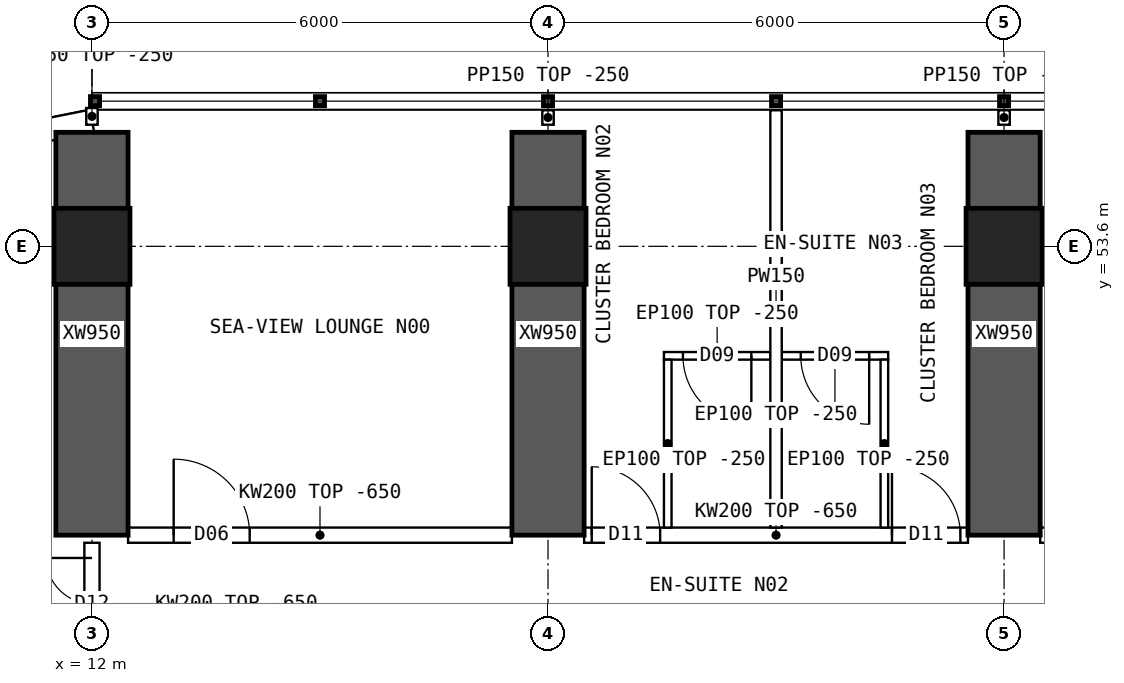
"""IFC4 building model, lengths in metres.
Left out: names, types, materials, properties, quantities, classifications, styles, units other than length and angle.
Written with IfcOpenShell. Run it as: python <this file> out.ifc"""

import sys

from ifc_helpers import new_model, si_unit, direction, frame, frame_2d, origin, origin_2d, place, context, subcontext, project, spatial, polyline, rectangle, hollow_rectangle, outline, extrude, element, fill, save


model = new_model("IFC4")
c1 = context("Model", 3, precision=1e-05, world=origin(), true_north=direction((0.0, 1.0)))
c2 = subcontext(c1, "Body", "Model", "MODEL_VIEW")
j1 = project(units=[si_unit("LENGTHUNIT", "METRE"), si_unit("PLANEANGLEUNIT", "RADIAN")], contexts=[c1])
p1 = place(None, origin())
s1 = spatial("IfcSite", under=j1, at=p1, CompositionType="ELEMENT")
p2 = place(p1, origin())
s2 = spatial("IfcBuilding", under=s1, at=p2, CompositionType="ELEMENT")
p3 = place(p2, frame((0.0, 0.0, 91.9)))
s3 = spatial("IfcBuildingStorey", under=s2, at=p3, CompositionType="ELEMENT", Elevation=91.9)
for number, where, z_axis, x_axis in (
    (1, (12.0, 53.6, 0.0), (0.0, 0.0, 1.0), (1.0, 0.0, 0.0)),
    (2, (18.0, 53.6, 0.0), (0.0, 0.0, 1.0), (1.0, 0.0, 0.0)),
    (3, (24.0, 53.6, 0.0), (0.0, 0.0, 1.0), (1.0, 0.0, 0.0)),
):
    element("IfcColumn", number, at=place(p3, frame(where, z_axis=z_axis, x_axis=x_axis)), inside=s3, PredefinedType="COLUMN", context=c2, shape_type="SweptSolid", body=[
        extrude(hollow_rectangle(XDim=1.0, YDim=1.0, WallThickness=0.1, at=origin_2d()), origin(), (0.0, 0.0, 1.0), 3.75),
    ])
for number, where, z_axis, x_axis in (
    (4, (12.0, 49.8, 0.0), (0.0, 0.0, 1.0), (0.0, 1.0, 0.0)),
    (5, (18.0, 49.8, 0.0), (0.0, 0.0, 1.0), (0.0, 1.0, 0.0)),
    (6, (24.0, 49.8, 0.0), (0.0, 0.0, 1.0), (0.0, 1.0, 0.0)),
):
    element("IfcWall", number, at=place(p3, frame(where, z_axis=z_axis, x_axis=x_axis)), inside=s3, PredefinedType="SHEAR", context=c2, shape_type="SweptSolid", body=[
        extrude(rectangle(XDim=5.3, YDim=0.95, at=frame_2d((2.65, 0.0))), origin(), (0.0, 0.0, 1.0), 3.75),
    ])
p4 = place(p3, frame((12.0, 55.25, 0.0), z_axis=(0.0, 0.0, 1.0), x_axis=(-0.980787251524, -0.195080412259, 0.0)))
e7 = element("IfcWall", 7, at=p4, inside=s3, PredefinedType="SOLIDWALL", context=c2, shape_type="SweptSolid", body=[
    extrude(outline(polyline([(-0.03, -0.15), (3.249, -0.15), (3.189, 0.15), (0.03, 0.15), (-0.03, -0.15)])), origin(), (0.0, 0.0, 1.0), 3.5),
])
p5 = place(p4, frame((0.909, 0.0, 0.9)))
e8 = element("IfcOpeningElement", 8, at=p5, cuts=e7, PredefinedType="OPENING", context=c2, shape_type="SweptSolid", body=[
    extrude(rectangle(XDim=1.4, YDim=1.8, at=frame_2d((0.7, 0.9))), frame((0.0, 0.16, 0.0), z_axis=(0.0, -1.0, 0.0), x_axis=(1.0, 0.0, 0.0)), (0.0, 0.0, 1.0), 0.32),
])
p6 = place(p3, frame((12.475, 49.8, 0.0), z_axis=(0.0, 0.0, 1.0), x_axis=(1.0, 0.0, 0.0)))
e9 = element("IfcWall", 9, at=p6, inside=s3, PredefinedType="SOLIDWALL", context=c2, shape_type="SweptSolid", body=[
    extrude(outline(polyline([(0.0, 0.0), (5.05, 0.0), (5.05, 3.1), (0.0, 3.1), (0.0, 0.0)])), frame((0.0, 0.1, 0.0), z_axis=(0.0, -1.0, 0.0), x_axis=(1.0, 0.0, 0.0)), (0.0, 0.0, 1.0), 0.2),
])
p7 = place(p6, frame((0.6, 0.0, 0.0)))
e10 = element("IfcOpeningElement", 10, at=p7, cuts=e9, PredefinedType="OPENING", context=c2, shape_type="SweptSolid", body=[
    extrude(rectangle(XDim=1.0, YDim=2.1, at=frame_2d((0.5, 1.05))), frame((0.0, 0.11, 0.0), z_axis=(0.0, -1.0, 0.0), x_axis=(1.0, 0.0, 0.0)), (0.0, 0.0, 1.0), 0.22),
])
p8 = place(p3, frame((18.475, 49.8, 0.0), z_axis=(0.0, 0.0, 1.0), x_axis=(1.0, 0.0, 0.0)))
e11 = element("IfcWall", 11, at=p8, inside=s3, PredefinedType="SOLIDWALL", context=c2, shape_type="SweptSolid", body=[
    extrude(outline(polyline([(0.0, 0.0), (5.05, 0.0), (5.05, 3.1), (0.0, 3.1), (0.0, 0.0)])), frame((0.0, 0.1, 0.0), z_axis=(0.0, -1.0, 0.0), x_axis=(1.0, 0.0, 0.0)), (0.0, 0.0, 1.0), 0.2),
])
p9 = place(p8, frame((0.1, 0.0, 0.0)))
e12 = element("IfcOpeningElement", 12, at=p9, cuts=e11, PredefinedType="OPENING", context=c2, shape_type="SweptSolid", body=[
    extrude(rectangle(XDim=0.9, YDim=2.1, at=frame_2d((0.45, 1.05))), frame((0.0, 0.11, 0.0), z_axis=(0.0, -1.0, 0.0), x_axis=(1.0, 0.0, 0.0)), (0.0, 0.0, 1.0), 0.22),
])
p10 = place(p8, frame((4.05, 0.0, 0.0)))
e13 = element("IfcOpeningElement", 13, at=p10, cuts=e11, PredefinedType="OPENING", context=c2, shape_type="SweptSolid", body=[
    extrude(rectangle(XDim=0.9, YDim=2.1, at=frame_2d((0.45, 1.05))), frame((0.0, 0.11, 0.0), z_axis=(0.0, -1.0, 0.0), x_axis=(1.0, 0.0, 0.0)), (0.0, 0.0, 1.0), 0.22),
])
p11 = place(p3, frame((24.475, 49.8, 0.0), z_axis=(0.0, 0.0, 1.0), x_axis=(1.0, 0.0, 0.0)))
e14 = element("IfcWall", 14, at=p11, inside=s3, PredefinedType="SOLIDWALL", context=c2, shape_type="SweptSolid", body=[
    extrude(outline(polyline([(0.0, 0.0), (5.05, 0.0), (5.05, 3.1), (0.0, 3.1), (0.0, 0.0)])), frame((0.0, 0.1, 0.0), z_axis=(0.0, -1.0, 0.0), x_axis=(1.0, 0.0, 0.0)), (0.0, 0.0, 1.0), 0.2),
])
p12 = place(p11, frame((0.6, 0.0, 0.0)))
e15 = element("IfcOpeningElement", 15, at=p12, cuts=e14, PredefinedType="OPENING", context=c2, shape_type="SweptSolid", body=[
    extrude(rectangle(XDim=1.0, YDim=2.1, at=frame_2d((0.5, 1.05))), frame((0.0, 0.11, 0.0), z_axis=(0.0, -1.0, 0.0), x_axis=(1.0, 0.0, 0.0)), (0.0, 0.0, 1.0), 0.22),
])
p13 = place(p3, frame((21.0, 55.39, 0.0), z_axis=(0.0, 0.0, 1.0), x_axis=(0.0, -1.0, 0.0)))
e16 = element("IfcWall", 16, at=p13, inside=s3, PredefinedType="PARTITIONING", context=c2, shape_type="SweptSolid", body=[
    extrude(outline(polyline([(0.0, 0.0), (5.49, 0.0), (5.49, 3.1), (5.442, 3.1), (5.44, 3.5), (1.992, 3.5), (1.99, 3.1), (1.592, 3.1), (1.59, 3.5), (0.0, 3.5), (0.0, 0.0)])), frame((0.0, 0.075, 0.0), z_axis=(0.0, -1.0, 0.0), x_axis=(1.0, 0.0, 0.0)), (0.0, 0.0, 1.0), 0.15),
])
p14 = place(p3, frame((19.525, 52.159, 0.0), z_axis=(0.0, 0.0, 1.0), x_axis=(1.0, 0.0, 0.0)))
e17 = element("IfcWall", 17, at=p14, inside=s3, PredefinedType="PARTITIONING", context=c2, shape_type="SweptSolid", body=[
    extrude(rectangle(XDim=1.4, YDim=0.1, at=frame_2d((0.7, 0.0))), origin(), (0.0, 0.0, 1.0), 3.5),
])
p15 = place(p14, frame((0.25, 0.0, 0.0)))
e18 = element("IfcOpeningElement", 18, at=p15, cuts=e17, PredefinedType="OPENING", context=c2, shape_type="SweptSolid", body=[
    extrude(rectangle(XDim=0.9, YDim=2.1, at=frame_2d((0.45, 1.05))), frame((0.0, 0.06, 0.0), z_axis=(0.0, -1.0, 0.0), x_axis=(1.0, 0.0, 0.0)), (0.0, 0.0, 1.0), 0.12),
])
p16 = place(p3, frame((19.575, 52.109, 0.0), z_axis=(0.0, 0.0, 1.0), x_axis=(0.0, -1.0, 0.0)))
e19 = element("IfcWall", 19, at=p16, inside=s3, PredefinedType="PARTITIONING", context=c2, shape_type="SweptSolid", body=[
    extrude(outline(polyline([(0.0, 0.0), (2.209, 0.0), (2.209, 3.1), (2.161, 3.1), (2.159, 3.5), (0.0, 3.5), (0.0, 0.0)])), frame((0.0, 0.05, 0.0), z_axis=(0.0, -1.0, 0.0), x_axis=(1.0, 0.0, 0.0)), (0.0, 0.0, 1.0), 0.1),
])
p17 = place(p3, frame((21.075, 52.159, 0.0), z_axis=(0.0, 0.0, 1.0), x_axis=(1.0, 0.0, 0.0)))
e20 = element("IfcWall", 20, at=p17, inside=s3, PredefinedType="PARTITIONING", context=c2, shape_type="SweptSolid", body=[
    extrude(rectangle(XDim=1.4, YDim=0.1, at=frame_2d((0.7, 0.0))), origin(), (0.0, 0.0, 1.0), 3.5),
])
p18 = place(p17, frame((0.25, 0.0, 0.0)))
e21 = element("IfcOpeningElement", 21, at=p18, cuts=e20, PredefinedType="OPENING", context=c2, shape_type="SweptSolid", body=[
    extrude(rectangle(XDim=0.9, YDim=2.1, at=frame_2d((0.45, 1.05))), frame((0.0, 0.06, 0.0), z_axis=(0.0, -1.0, 0.0), x_axis=(1.0, 0.0, 0.0)), (0.0, 0.0, 1.0), 0.12),
])
p19 = place(p3, frame((22.425, 52.109, 0.0), z_axis=(0.0, 0.0, 1.0), x_axis=(0.0, -1.0, 0.0)))
e22 = element("IfcWall", 22, at=p19, inside=s3, PredefinedType="PARTITIONING", context=c2, shape_type="SweptSolid", body=[
    extrude(outline(polyline([(0.0, 0.0), (2.209, 0.0), (2.209, 3.1), (2.161, 3.1), (2.159, 3.5), (0.0, 3.5), (0.0, 0.0)])), frame((0.0, 0.05, 0.0), z_axis=(0.0, -1.0, 0.0), x_axis=(1.0, 0.0, 0.0)), (0.0, 0.0, 1.0), 0.1),
])
p20 = place(p3, frame((12.0, 48.1, 0.0), z_axis=(0.0, 0.0, 1.0), x_axis=(0.0, 1.0, 0.0)))
e23 = element("IfcWall", 23, at=p20, inside=s3, PredefinedType="SOLIDWALL", context=c2, shape_type="SweptSolid", body=[
    extrude(outline(polyline([(0.0, 0.0), (1.6, 0.0), (1.6, 3.1), (0.0, 3.1), (0.0, 0.0)])), frame((0.0, 0.1, 0.0), z_axis=(0.0, -1.0, 0.0), x_axis=(1.0, 0.0, 0.0)), (0.0, 0.0, 1.0), 0.2),
])
p21 = place(p20, frame((0.2, 0.0, 0.0)))
e24 = element("IfcOpeningElement", 24, at=p21, cuts=e23, PredefinedType="OPENING", context=c2, shape_type="SweptSolid", body=[
    extrude(rectangle(XDim=1.2, YDim=2.1, at=frame_2d((0.6, 1.05))), frame((0.0, 0.11, 0.0), z_axis=(0.0, -1.0, 0.0), x_axis=(1.0, 0.0, 0.0)), (0.0, 0.0, 1.0), 0.22),
])
p22 = place(p3, frame((12.0, 55.2, 0.0), z_axis=(0.0, 0.0, 1.0), x_axis=(0.0, 1.0, 0.0)))
e25 = element("IfcWall", 25, at=p22, inside=s3, PredefinedType="PARTITIONING", context=c2, shape_type="SweptSolid", body=[
    extrude(rectangle(XDim=0.22, YDim=0.15, at=frame_2d((0.11, 0.0))), origin(), (0.0, 0.0, 1.0), 3.5),
])
for number, where, z_axis, x_axis in (
    (26, (18.0, 55.2, 0.0), (0.0, 0.0, 1.0), (0.0, 1.0, 0.0)),
    (27, (24.0, 55.2, 0.0), (0.0, 0.0, 1.0), (0.0, 1.0, 0.0)),
):
    element("IfcWall", number, at=place(p3, frame(where, z_axis=z_axis, x_axis=x_axis)), inside=s3, PredefinedType="PARTITIONING", context=c2, shape_type="SweptSolid", body=[
        extrude(rectangle(XDim=0.19, YDim=0.15, at=frame_2d((0.095, 0.0))), origin(), (0.0, 0.0, 1.0), 3.5),
    ])
p23 = place(p7, origin())
e28 = element("IfcDoor", 28, at=p23, inside=s3, OperationType="SINGLE_SWING_LEFT", PredefinedType="DOOR", context=c2, shape_type="SweptSolid", body=[
    extrude(rectangle(XDim=1.0, YDim=2.1, at=frame_2d((0.5, 1.05))), frame((0.0, 0.025, 0.0), z_axis=(0.0, -1.0, 0.0), x_axis=(1.0, 0.0, 0.0)), (0.0, 0.0, 1.0), 0.05),
])
fill(e10, e28)
p24 = place(p15, origin())
e29 = element("IfcDoor", 29, at=p24, inside=s3, OperationType="SINGLE_SWING_RIGHT", PredefinedType="DOOR", context=c2, shape_type="SweptSolid", body=[
    extrude(rectangle(XDim=0.9, YDim=2.1, at=frame_2d((0.45, 1.05))), frame((0.0, 0.025, 0.0), z_axis=(0.0, -1.0, 0.0), x_axis=(1.0, 0.0, 0.0)), (0.0, 0.0, 1.0), 0.05),
])
fill(e18, e29)
p25 = place(p9, origin())
e30 = element("IfcDoor", 30, at=p25, inside=s3, OperationType="SINGLE_SWING_LEFT", PredefinedType="DOOR", context=c2, shape_type="SweptSolid", body=[
    extrude(rectangle(XDim=0.9, YDim=2.1, at=frame_2d((0.45, 1.05))), frame((0.0, 0.025, 0.0), z_axis=(0.0, -1.0, 0.0), x_axis=(1.0, 0.0, 0.0)), (0.0, 0.0, 1.0), 0.05),
])
fill(e12, e30)
p26 = place(p18, origin())
e31 = element("IfcDoor", 31, at=p26, inside=s3, OperationType="SINGLE_SWING_RIGHT", PredefinedType="DOOR", context=c2, shape_type="SweptSolid", body=[
    extrude(rectangle(XDim=0.9, YDim=2.1, at=frame_2d((0.45, 1.05))), frame((0.0, 0.025, 0.0), z_axis=(0.0, -1.0, 0.0), x_axis=(1.0, 0.0, 0.0)), (0.0, 0.0, 1.0), 0.05),
])
fill(e21, e31)
p27 = place(p10, origin())
e32 = element("IfcDoor", 32, at=p27, inside=s3, OperationType="SINGLE_SWING_LEFT", PredefinedType="DOOR", context=c2, shape_type="SweptSolid", body=[
    extrude(rectangle(XDim=0.9, YDim=2.1, at=frame_2d((0.45, 1.05))), frame((0.0, 0.025, 0.0), z_axis=(0.0, -1.0, 0.0), x_axis=(1.0, 0.0, 0.0)), (0.0, 0.0, 1.0), 0.05),
])
fill(e13, e32)
p28 = place(p21, origin())
e33 = element("IfcDoor", 33, at=p28, inside=s3, OperationType="DOUBLE_DOOR_SINGLE_SWING", PredefinedType="DOOR", context=c2, shape_type="SweptSolid", body=[
    extrude(rectangle(XDim=1.2, YDim=2.1, at=frame_2d((0.6, 1.05))), frame((0.0, 0.025, 0.0), z_axis=(0.0, -1.0, 0.0), x_axis=(1.0, 0.0, 0.0)), (0.0, 0.0, 1.0), 0.05),
])
fill(e24, e33)
save(model, sys.argv[1])
